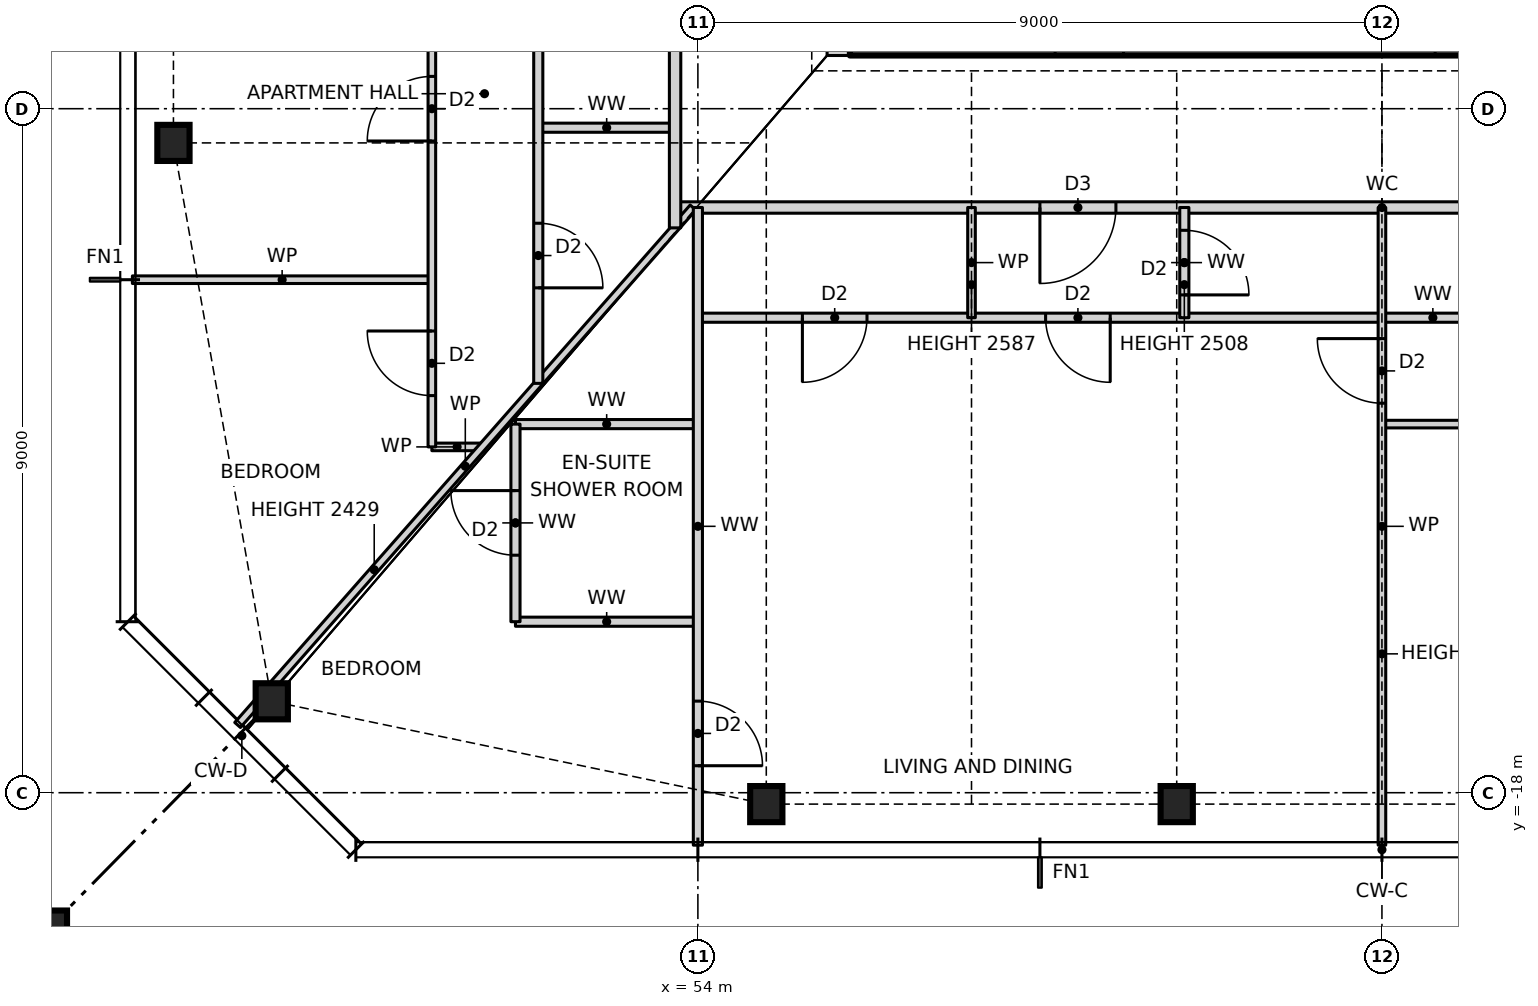
"""IFC4 building model, lengths in metres.
Left out: names, types, materials, properties, quantities, classifications, styles, units other than length and angle.
Written with IfcOpenShell. Run it as: python <this file> out.ifc"""

import sys

from ifc_helpers import new_model, si_unit, direction, frame, frame_2d, origin, origin_2d, place, context, subcontext, project, spatial, rectangle, hollow_rectangle, i_section, extrude, element, fill, save


model = new_model("IFC4")
c1 = context("Model", 3, precision=1e-05, world=origin(), true_north=direction((0.0, 1.0)))
c2 = subcontext(c1, "Body", "Model", "MODEL_VIEW")
j1 = project(units=[si_unit("LENGTHUNIT", "METRE"), si_unit("PLANEANGLEUNIT", "RADIAN")], contexts=[c1])
p1 = place(None, origin())
s1 = spatial("IfcSite", under=j1, at=p1, CompositionType="ELEMENT")
p2 = place(p1, origin())
s2 = spatial("IfcBuilding", under=s1, at=p2, CompositionType="ELEMENT")
p3 = place(p2, frame((0.0, 0.0, 50.0)))
s3 = spatial("IfcBuildingStorey", under=s2, at=p3, CompositionType="ELEMENT", Elevation=50.0)
for number, where, z_axis, x_axis in (
    (1, (48.394, -16.797, 0.0), (0.0, 0.0, 1.0), (1.0, 0.0, 0.0)),
    (2, (54.9, -18.15, 0.0), (0.0, 0.0, 1.0), (1.0, 0.0, 0.0)),
    (3, (60.3, -18.15, 0.0), (0.0, 0.0, 1.0), (1.0, 0.0, 0.0)),
    (4, (47.1, -9.45, 0.0), (0.0, 0.0, 1.0), (1.0, 0.0, 0.0)),
):
    element("IfcColumn", number, at=place(p3, frame(where, z_axis=z_axis, x_axis=x_axis)), inside=s3, PredefinedType="COLUMN", context=c2, shape_type="SweptSolid", body=[
        extrude(i_section(OverallWidth=0.424, OverallDepth=0.475, WebThickness=0.048, FlangeThickness=0.077, at=origin_2d()), origin(), (0.0, 0.0, 1.0), 3.5),
    ])
p4 = place(p3, frame((45.1, -20.15, 0.0), z_axis=(0.0, 0.0, 1.0), x_axis=(1.0, 0.0, 0.0)))
e5 = element("IfcColumn", 5, at=p4, inside=s3, PredefinedType="COLUMN", context=c2, shape_type="SweptSolid", body=[
    extrude(hollow_rectangle(XDim=1.2, YDim=1.2, WallThickness=0.07, at=origin_2d()), origin(), (0.0, 0.0, 1.0), 3.5),
])
p5 = place(p3, frame((55.7, -8.15, 0.0), z_axis=(0.0, 0.0, 1.0), x_axis=(1.0, 0.0, 0.0)))
e6 = element("IfcWall", 6, at=p5, inside=s3, PredefinedType="SOLIDWALL", context=c2, shape_type="SweptSolid", body=[
    extrude(rectangle(XDim=0.3, YDim=0.3, at=frame_2d((0.15, 0.0))), origin(), (0.0, 0.0, 1.0), 3.5),
])
p6 = place(p3, frame((56.0, -8.0, 0.0), z_axis=(0.0, 0.0, 1.0), x_axis=(1.0, 0.0, 0.0)))
e7 = element("IfcWall", 7, at=p6, inside=s3, PredefinedType="SHEAR", context=c2, shape_type="SweptSolid", body=[
    extrude(rectangle(XDim=14.0, YDim=0.6, at=frame_2d((7.0, 0.0))), origin(), (0.0, 0.0, 1.0), 3.5),
])
p7 = place(p6, frame((2.7, 0.0, 0.0)))
e8 = element("IfcOpeningElement", 8, at=p7, cuts=e7, PredefinedType="OPENING", context=c2, shape_type="SweptSolid", body=[
    extrude(rectangle(XDim=0.9, YDim=2.1, at=frame_2d((0.45, 1.05))), frame((0.0, 0.31, 0.0), z_axis=(0.0, -1.0, 0.0), x_axis=(1.0, 0.0, 0.0)), (0.0, 0.0, 1.0), 0.62),
])
p8 = place(p6, frame((7.7, 0.0, 0.0)))
e9 = element("IfcOpeningElement", 9, at=p8, cuts=e7, PredefinedType="OPENING", context=c2, shape_type="SweptSolid", body=[
    extrude(rectangle(XDim=0.9, YDim=2.1, at=frame_2d((0.45, 1.05))), frame((0.0, 0.31, 0.0), z_axis=(0.0, -1.0, 0.0), x_axis=(1.0, 0.0, 0.0)), (0.0, 0.0, 1.0), 0.62),
])
p9 = place(p3, frame((51.6, -15.75, 0.0), z_axis=(0.0, 0.0, 1.0), x_axis=(1.0, 0.0, 0.0)))
e10 = element("IfcWall", 10, at=p9, inside=s3, PredefinedType="PARTITIONING", context=c2, shape_type="SweptSolid", body=[
    extrude(rectangle(XDim=2.4, YDim=0.12, at=frame_2d((1.2, 0.0))), origin(), (0.0, 0.0, 1.0), 3.27),
])
p10 = place(p3, frame((50.5, -13.45, 0.0), z_axis=(0.0, 0.0, 1.0), x_axis=(1.0, 0.0, 0.0)))
e11 = element("IfcWall", 11, at=p10, inside=s3, PredefinedType="PARTITIONING", context=c2, shape_type="SweptSolid", body=[
    extrude(rectangle(XDim=0.664, YDim=0.1, at=frame_2d((0.332, 0.0))), origin(), (0.0, 0.0, 1.0), 3.27),
])
p11 = place(p3, frame((51.6, -13.15, 0.0), z_axis=(0.0, 0.0, 1.0), x_axis=(1.0, 0.0, 0.0)))
e12 = element("IfcWall", 12, at=p11, inside=s3, PredefinedType="PARTITIONING", context=c2, shape_type="SweptSolid", body=[
    extrude(rectangle(XDim=2.4, YDim=0.12, at=frame_2d((1.2, 0.0))), origin(), (0.0, 0.0, 1.0), 3.27),
])
p12 = place(p3, frame((63.0, -13.15, 0.0), z_axis=(0.0, 0.0, 1.0), x_axis=(1.0, 0.0, 0.0)))
e13 = element("IfcWall", 13, at=p12, inside=s3, PredefinedType="PARTITIONING", context=c2, shape_type="SweptSolid", body=[
    extrude(rectangle(XDim=11.2, YDim=0.1, at=frame_2d((5.6, 0.0))), origin(), (0.0, 0.0, 1.0), 3.27),
])
p13 = place(p12, frame((1.825, 0.0, 0.0)))
e14 = element("IfcOpeningElement", 14, at=p13, cuts=e13, PredefinedType="OPENING", context=c2, shape_type="SweptSolid", body=[
    extrude(rectangle(XDim=0.85, YDim=2.1, at=frame_2d((0.425, 1.05))), frame((0.0, 0.06, 0.0), z_axis=(0.0, -1.0, 0.0), x_axis=(1.0, 0.0, 0.0)), (0.0, 0.0, 1.0), 0.12),
])
p14 = place(p12, frame((6.325, 0.0, 0.0)))
e15 = element("IfcOpeningElement", 15, at=p14, cuts=e13, PredefinedType="OPENING", context=c2, shape_type="SweptSolid", body=[
    extrude(rectangle(XDim=0.85, YDim=2.1, at=frame_2d((0.425, 1.05))), frame((0.0, 0.06, 0.0), z_axis=(0.0, -1.0, 0.0), x_axis=(1.0, 0.0, 0.0)), (0.0, 0.0, 1.0), 0.12),
])
p15 = place(p12, frame((9.675, 0.0, 0.0)))
e16 = element("IfcOpeningElement", 16, at=p15, cuts=e13, PredefinedType="OPENING", context=c2, shape_type="SweptSolid", body=[
    extrude(rectangle(XDim=0.85, YDim=2.1, at=frame_2d((0.425, 1.05))), frame((0.0, 0.06, 0.0), z_axis=(0.0, -1.0, 0.0), x_axis=(1.0, 0.0, 0.0)), (0.0, 0.0, 1.0), 0.12),
])
p16 = place(p3, frame((54.0, -11.75, 0.0), z_axis=(0.0, 0.0, 1.0), x_axis=(1.0, 0.0, 0.0)))
e17 = element("IfcWall", 17, at=p16, inside=s3, PredefinedType="PARTITIONING", context=c2, shape_type="SweptSolid", body=[
    extrude(rectangle(XDim=19.34, YDim=0.12, at=frame_2d((9.67, 0.0))), origin(), (0.0, 0.0, 1.0), 3.27),
])
p17 = place(p16, frame((1.375, 0.0, 0.0)))
e18 = element("IfcOpeningElement", 18, at=p17, cuts=e17, PredefinedType="OPENING", context=c2, shape_type="SweptSolid", body=[
    extrude(rectangle(XDim=0.85, YDim=2.1, at=frame_2d((0.425, 1.05))), frame((0.0, 0.07, 0.0), z_axis=(0.0, -1.0, 0.0), x_axis=(1.0, 0.0, 0.0)), (0.0, 0.0, 1.0), 0.14),
])
p18 = place(p16, frame((4.575, 0.0, 0.0)))
e19 = element("IfcOpeningElement", 19, at=p18, cuts=e17, PredefinedType="OPENING", context=c2, shape_type="SweptSolid", body=[
    extrude(rectangle(XDim=0.85, YDim=2.1, at=frame_2d((0.425, 1.05))), frame((0.0, 0.07, 0.0), z_axis=(0.0, -1.0, 0.0), x_axis=(1.0, 0.0, 0.0)), (0.0, 0.0, 1.0), 0.14),
])
p19 = place(p16, frame((11.325, 0.0, 0.0)))
e20 = element("IfcOpeningElement", 20, at=p19, cuts=e17, PredefinedType="OPENING", context=c2, shape_type="SweptSolid", body=[
    extrude(rectangle(XDim=0.85, YDim=2.1, at=frame_2d((0.425, 1.05))), frame((0.0, 0.07, 0.0), z_axis=(0.0, -1.0, 0.0), x_axis=(1.0, 0.0, 0.0)), (0.0, 0.0, 1.0), 0.14),
])
p20 = place(p16, frame((16.495, 0.0, 0.0)))
e21 = element("IfcOpeningElement", 21, at=p20, cuts=e17, PredefinedType="OPENING", context=c2, shape_type="SweptSolid", body=[
    extrude(rectangle(XDim=0.85, YDim=2.1, at=frame_2d((0.425, 1.05))), frame((0.0, 0.07, 0.0), z_axis=(0.0, -1.0, 0.0), x_axis=(1.0, 0.0, 0.0)), (0.0, 0.0, 1.0), 0.14),
])
p21 = place(p3, frame((46.56, -11.25, 0.0), z_axis=(0.0, 0.0, 1.0), x_axis=(1.0, 0.0, 0.0)))
e22 = element("IfcWall", 22, at=p21, inside=s3, PredefinedType="PARTITIONING", context=c2, shape_type="SweptSolid", body=[
    extrude(rectangle(XDim=3.94, YDim=0.1, at=frame_2d((1.97, 0.0))), origin(), (0.0, 0.0, 1.0), 3.27),
])
p22 = place(p3, frame((53.7, -10.3, 0.0), z_axis=(0.0, 0.0, 1.0), x_axis=(1.0, 0.0, 0.0)))
e23 = element("IfcWall", 23, at=p22, inside=s3, PredefinedType="PARTITIONING", context=c2, shape_type="SweptSolid", body=[
    extrude(rectangle(XDim=18.6, YDim=0.15, at=frame_2d((9.3, 0.0))), origin(), (0.0, 0.0, 1.0), 3.27),
])
p23 = place(p22, frame((4.8, 0.0, 0.0)))
e24 = element("IfcOpeningElement", 24, at=p23, cuts=e23, PredefinedType="OPENING", context=c2, shape_type="SweptSolid", body=[
    extrude(rectangle(XDim=1.0, YDim=2.1, at=frame_2d((0.5, 1.05))), frame((0.0, 0.085, 0.0), z_axis=(0.0, -1.0, 0.0), x_axis=(1.0, 0.0, 0.0)), (0.0, 0.0, 1.0), 0.17),
])
p24 = place(p3, frame((51.9, -9.25, 0.0), z_axis=(0.0, 0.0, 1.0), x_axis=(1.0, 0.0, 0.0)))
e25 = element("IfcWall", 25, at=p24, inside=s3, PredefinedType="PARTITIONING", context=c2, shape_type="SweptSolid", body=[
    extrude(rectangle(XDim=1.8, YDim=0.12, at=frame_2d((0.9, 0.0))), origin(), (0.0, 0.0, 1.0), 3.27),
])
p25 = place(p3, frame((47.944, -17.109, 0.0), z_axis=(0.0, 0.0, 1.0), x_axis=(0.660638210404, 0.750704439146, 0.0)))
e26 = element("IfcWall", 26, at=p25, inside=s3, PredefinedType="PARTITIONING", context=c2, shape_type="SweptSolid", body=[
    extrude(rectangle(XDim=9.07, YDim=0.1, at=frame_2d((4.535, 0.0))), origin(), (0.0, 0.0, 1.0), 2.429),
])
p26 = place(p3, frame((63.0, -18.69, 0.0), z_axis=(0.0, 0.0, 1.0), x_axis=(0.0, 1.0, 0.0)))
e27 = element("IfcWall", 27, at=p26, inside=s3, PredefinedType="PARTITIONING", context=c2, shape_type="SweptSolid", body=[
    extrude(rectangle(XDim=8.39, YDim=0.1, at=frame_2d((4.195, 0.0))), origin(), (0.0, 0.0, 1.0), 2.587),
])
p27 = place(p26, frame((5.815, 0.0, 0.0)))
e28 = element("IfcOpeningElement", 28, at=p27, cuts=e27, PredefinedType="OPENING", context=c2, shape_type="SweptSolid", body=[
    extrude(rectangle(XDim=0.85, YDim=2.1, at=frame_2d((0.425, 1.05))), frame((0.0, 0.06, 0.0), z_axis=(0.0, -1.0, 0.0), x_axis=(1.0, 0.0, 0.0)), (0.0, 0.0, 1.0), 0.12),
])
p28 = place(p3, frame((60.4, -11.75, 0.0), z_axis=(0.0, 0.0, 1.0), x_axis=(0.0, 1.0, 0.0)))
e29 = element("IfcWall", 29, at=p28, inside=s3, PredefinedType="PARTITIONING", context=c2, shape_type="SweptSolid", body=[
    extrude(rectangle(XDim=1.45, YDim=0.12, at=frame_2d((0.725, 0.0))), origin(), (0.0, 0.0, 1.0), 2.508),
])
p29 = place(p28, frame((0.3, 0.0, 0.0)))
e30 = element("IfcOpeningElement", 30, at=p29, cuts=e29, PredefinedType="OPENING", context=c2, shape_type="SweptSolid", body=[
    extrude(rectangle(XDim=0.85, YDim=2.1, at=frame_2d((0.425, 1.05))), frame((0.0, 0.07, 0.0), z_axis=(0.0, -1.0, 0.0), x_axis=(1.0, 0.0, 0.0)), (0.0, 0.0, 1.0), 0.14),
])
p30 = place(p3, frame((57.6, -11.75, 0.0), z_axis=(0.0, 0.0, 1.0), x_axis=(0.0, 1.0, 0.0)))
e31 = element("IfcWall", 31, at=p30, inside=s3, PredefinedType="PARTITIONING", context=c2, shape_type="SweptSolid", body=[
    extrude(rectangle(XDim=1.45, YDim=0.1, at=frame_2d((0.725, 0.0))), origin(), (0.0, 0.0, 1.0), 2.587),
])
p31 = place(p3, frame((54.0, -18.69, 0.0), z_axis=(0.0, 0.0, 1.0), x_axis=(0.0, 1.0, 0.0)))
e32 = element("IfcWall", 32, at=p31, inside=s3, PredefinedType="PARTITIONING", context=c2, shape_type="SweptSolid", body=[
    extrude(rectangle(XDim=8.39, YDim=0.12, at=frame_2d((4.195, 0.0))), origin(), (0.0, 0.0, 1.0), 3.27),
])
p32 = place(p31, frame((1.045, 0.0, 0.0)))
e33 = element("IfcOpeningElement", 33, at=p32, cuts=e32, PredefinedType="OPENING", context=c2, shape_type="SweptSolid", body=[
    extrude(rectangle(XDim=0.85, YDim=2.1, at=frame_2d((0.425, 1.05))), frame((0.0, 0.07, 0.0), z_axis=(0.0, -1.0, 0.0), x_axis=(1.0, 0.0, 0.0)), (0.0, 0.0, 1.0), 0.14),
])
p33 = place(p3, frame((53.7, -10.568, 0.0), z_axis=(0.0, 0.0, 1.0), x_axis=(0.0, 1.0, 0.0)))
e34 = element("IfcWall", 34, at=p33, inside=s3, PredefinedType="PARTITIONING", context=c2, shape_type="SweptSolid", body=[
    extrude(rectangle(XDim=21.136, YDim=0.15, at=frame_2d((10.568, 0.0))), origin(), (0.0, 0.0, 1.0), 3.27),
])
p34 = place(p33, frame((16.318, 0.0, 0.0)))
e35 = element("IfcOpeningElement", 35, at=p34, cuts=e34, PredefinedType="OPENING", context=c2, shape_type="SweptSolid", body=[
    extrude(rectangle(XDim=1.0, YDim=2.1, at=frame_2d((0.5, 1.05))), frame((0.0, 0.085, 0.0), z_axis=(0.0, -1.0, 0.0), x_axis=(1.0, 0.0, 0.0)), (0.0, 0.0, 1.0), 0.17),
])
p35 = place(p33, frame((10.918, 0.0, 0.0)))
e36 = element("IfcOpeningElement", 36, at=p35, cuts=e34, PredefinedType="OPENING", context=c2, shape_type="SweptSolid", body=[
    extrude(rectangle(XDim=1.0, YDim=2.1, at=frame_2d((0.5, 1.05))), frame((0.0, 0.085, 0.0), z_axis=(0.0, -1.0, 0.0), x_axis=(1.0, 0.0, 0.0)), (0.0, 0.0, 1.0), 0.17),
])
p36 = place(p3, frame((51.9, -12.614, 0.0), z_axis=(0.0, 0.0, 1.0), x_axis=(0.0, 1.0, 0.0)))
e37 = element("IfcWall", 37, at=p36, inside=s3, PredefinedType="PARTITIONING", context=c2, shape_type="SweptSolid", body=[
    extrude(rectangle(XDim=10.364, YDim=0.12, at=frame_2d((5.182, 0.0))), origin(), (0.0, 0.0, 1.0), 3.27),
])
p37 = place(p36, frame((8.639, 0.0, 0.0)))
e38 = element("IfcOpeningElement", 38, at=p37, cuts=e37, PredefinedType="OPENING", context=c2, shape_type="SweptSolid", body=[
    extrude(rectangle(XDim=0.85, YDim=2.1, at=frame_2d((0.425, 1.05))), frame((0.0, 0.07, 0.0), z_axis=(0.0, -1.0, 0.0), x_axis=(1.0, 0.0, 0.0)), (0.0, 0.0, 1.0), 0.14),
])
p38 = place(p36, frame((5.139, 0.0, 0.0)))
e39 = element("IfcOpeningElement", 39, at=p38, cuts=e37, PredefinedType="OPENING", context=c2, shape_type="SweptSolid", body=[
    extrude(rectangle(XDim=0.85, YDim=2.1, at=frame_2d((0.425, 1.05))), frame((0.0, 0.07, 0.0), z_axis=(0.0, -1.0, 0.0), x_axis=(1.0, 0.0, 0.0)), (0.0, 0.0, 1.0), 0.14),
])
p39 = place(p36, frame((1.257, 0.0, 0.0)))
e40 = element("IfcOpeningElement", 40, at=p39, cuts=e37, PredefinedType="OPENING", context=c2, shape_type="SweptSolid", body=[
    extrude(rectangle(XDim=0.85, YDim=2.1, at=frame_2d((0.425, 1.05))), frame((0.0, 0.07, 0.0), z_axis=(0.0, -1.0, 0.0), x_axis=(1.0, 0.0, 0.0)), (0.0, 0.0, 1.0), 0.14),
])
p40 = place(p3, frame((51.6, -15.75, 0.0), z_axis=(0.0, 0.0, 1.0), x_axis=(0.0, 1.0, 0.0)))
e41 = element("IfcWall", 41, at=p40, inside=s3, PredefinedType="PARTITIONING", context=c2, shape_type="SweptSolid", body=[
    extrude(rectangle(XDim=2.6, YDim=0.12, at=frame_2d((1.3, 0.0))), origin(), (0.0, 0.0, 1.0), 3.27),
])
p41 = place(p40, frame((0.875, 0.0, 0.0)))
e42 = element("IfcOpeningElement", 42, at=p41, cuts=e41, PredefinedType="OPENING", context=c2, shape_type="SweptSolid", body=[
    extrude(rectangle(XDim=0.85, YDim=2.1, at=frame_2d((0.425, 1.05))), frame((0.0, 0.07, 0.0), z_axis=(0.0, -1.0, 0.0), x_axis=(1.0, 0.0, 0.0)), (0.0, 0.0, 1.0), 0.14),
])
p42 = place(p3, frame((50.5, -13.45, 0.0), z_axis=(0.0, 0.0, 1.0), x_axis=(0.0, 1.0, 0.0)))
e43 = element("IfcWall", 43, at=p42, inside=s3, PredefinedType="PARTITIONING", context=c2, shape_type="SweptSolid", body=[
    extrude(rectangle(XDim=11.2, YDim=0.1, at=frame_2d((5.6, 0.0))), origin(), (0.0, 0.0, 1.0), 3.27),
])
p43 = place(p42, frame((9.725, 0.0, 0.0)))
e44 = element("IfcOpeningElement", 44, at=p43, cuts=e43, PredefinedType="OPENING", context=c2, shape_type="SweptSolid", body=[
    extrude(rectangle(XDim=0.85, YDim=2.1, at=frame_2d((0.425, 1.05))), frame((0.0, 0.06, 0.0), z_axis=(0.0, -1.0, 0.0), x_axis=(1.0, 0.0, 0.0)), (0.0, 0.0, 1.0), 0.12),
])
p44 = place(p42, frame((4.025, 0.0, 0.0)))
e45 = element("IfcOpeningElement", 45, at=p44, cuts=e43, PredefinedType="OPENING", context=c2, shape_type="SweptSolid", body=[
    extrude(rectangle(XDim=0.85, YDim=2.1, at=frame_2d((0.425, 1.05))), frame((0.0, 0.06, 0.0), z_axis=(0.0, -1.0, 0.0), x_axis=(1.0, 0.0, 0.0)), (0.0, 0.0, 1.0), 0.12),
])
p45 = place(p42, frame((0.675, 0.0, 0.0)))
e46 = element("IfcOpeningElement", 46, at=p45, cuts=e43, PredefinedType="OPENING", context=c2, shape_type="SweptSolid", body=[
    extrude(rectangle(XDim=0.85, YDim=2.1, at=frame_2d((0.425, 1.05))), frame((0.0, 0.06, 0.0), z_axis=(0.0, -1.0, 0.0), x_axis=(1.0, 0.0, 0.0)), (0.0, 0.0, 1.0), 0.12),
])
p46 = place(p17, frame((0.85, 0.0, 0.0), z_axis=(0.0, 0.0, 1.0), x_axis=(-1.0, 0.0, 0.0)))
e47 = element("IfcDoor", 47, at=p46, inside=s3, OperationType="SINGLE_SWING_RIGHT", PredefinedType="DOOR", context=c2, shape_type="SweptSolid", body=[
    extrude(rectangle(XDim=0.85, YDim=2.1, at=frame_2d((0.425, 1.05))), frame((0.0, 0.025, 0.0), z_axis=(0.0, -1.0, 0.0), x_axis=(1.0, 0.0, 0.0)), (0.0, 0.0, 1.0), 0.05),
])
fill(e18, e47)
p47 = place(p23, frame((1.0, 0.0, 0.0), z_axis=(0.0, 0.0, 1.0), x_axis=(-1.0, 0.0, 0.0)))
e48 = element("IfcDoor", 48, at=p47, inside=s3, OperationType="SINGLE_SWING_RIGHT", PredefinedType="DOOR", context=c2, shape_type="SweptSolid", body=[
    extrude(rectangle(XDim=1.0, YDim=2.1, at=frame_2d((0.5, 1.05))), frame((0.0, 0.025, 0.0), z_axis=(0.0, -1.0, 0.0), x_axis=(1.0, 0.0, 0.0)), (0.0, 0.0, 1.0), 0.05),
])
fill(e24, e48)
p48 = place(p18, frame((0.85, 0.0, 0.0), z_axis=(0.0, 0.0, 1.0), x_axis=(-1.0, 0.0, 0.0)))
e49 = element("IfcDoor", 49, at=p48, inside=s3, OperationType="SINGLE_SWING_LEFT", PredefinedType="DOOR", context=c2, shape_type="SweptSolid", body=[
    extrude(rectangle(XDim=0.85, YDim=2.1, at=frame_2d((0.425, 1.05))), frame((0.0, 0.025, 0.0), z_axis=(0.0, -1.0, 0.0), x_axis=(1.0, 0.0, 0.0)), (0.0, 0.0, 1.0), 0.05),
])
fill(e19, e49)
p49 = place(p29, frame((0.85, 0.0, 0.0), z_axis=(0.0, 0.0, 1.0), x_axis=(-1.0, 0.0, 0.0)))
e50 = element("IfcDoor", 50, at=p49, inside=s3, OperationType="SINGLE_SWING_RIGHT", PredefinedType="DOOR", context=c2, shape_type="SweptSolid", body=[
    extrude(rectangle(XDim=0.85, YDim=2.1, at=frame_2d((0.425, 1.05))), frame((0.0, 0.025, 0.0), z_axis=(0.0, -1.0, 0.0), x_axis=(1.0, 0.0, 0.0)), (0.0, 0.0, 1.0), 0.05),
])
fill(e30, e50)
p50 = place(p41, origin())
e51 = element("IfcDoor", 51, at=p50, inside=s3, OperationType="SINGLE_SWING_RIGHT", PredefinedType="DOOR", context=c2, shape_type="SweptSolid", body=[
    extrude(rectangle(XDim=0.85, YDim=2.1, at=frame_2d((0.425, 1.05))), frame((0.0, 0.025, 0.0), z_axis=(0.0, -1.0, 0.0), x_axis=(1.0, 0.0, 0.0)), (0.0, 0.0, 1.0), 0.05),
])
fill(e42, e51)
p51 = place(p32, frame((0.85, 0.0, 0.0), z_axis=(0.0, 0.0, 1.0), x_axis=(-1.0, 0.0, 0.0)))
e52 = element("IfcDoor", 52, at=p51, inside=s3, OperationType="SINGLE_SWING_RIGHT", PredefinedType="DOOR", context=c2, shape_type="SweptSolid", body=[
    extrude(rectangle(XDim=0.85, YDim=2.1, at=frame_2d((0.425, 1.05))), frame((0.0, 0.025, 0.0), z_axis=(0.0, -1.0, 0.0), x_axis=(1.0, 0.0, 0.0)), (0.0, 0.0, 1.0), 0.05),
])
fill(e33, e52)
p52 = place(p27, origin())
e53 = element("IfcDoor", 53, at=p52, inside=s3, OperationType="SINGLE_SWING_RIGHT", PredefinedType="DOOR", context=c2, shape_type="SweptSolid", body=[
    extrude(rectangle(XDim=0.85, YDim=2.1, at=frame_2d((0.425, 1.05))), frame((0.0, 0.025, 0.0), z_axis=(0.0, -1.0, 0.0), x_axis=(1.0, 0.0, 0.0)), (0.0, 0.0, 1.0), 0.05),
])
fill(e28, e53)
p53 = place(p44, origin())
e54 = element("IfcDoor", 54, at=p53, inside=s3, OperationType="SINGLE_SWING_LEFT", PredefinedType="DOOR", context=c2, shape_type="SweptSolid", body=[
    extrude(rectangle(XDim=0.85, YDim=2.1, at=frame_2d((0.425, 1.05))), frame((0.0, 0.025, 0.0), z_axis=(0.0, -1.0, 0.0), x_axis=(1.0, 0.0, 0.0)), (0.0, 0.0, 1.0), 0.05),
])
fill(e45, e54)
p54 = place(p45, origin())
e55 = element("IfcDoor", 55, at=p54, inside=s3, OperationType="SINGLE_SWING_RIGHT", PredefinedType="DOOR", context=c2, shape_type="SweptSolid", body=[
    extrude(rectangle(XDim=0.85, YDim=2.1, at=frame_2d((0.425, 1.05))), frame((0.0, 0.025, 0.0), z_axis=(0.0, -1.0, 0.0), x_axis=(1.0, 0.0, 0.0)), (0.0, 0.0, 1.0), 0.05),
])
fill(e46, e55)
p55 = place(p39, frame((0.85, 0.0, 0.0), z_axis=(0.0, 0.0, 1.0), x_axis=(-1.0, 0.0, 0.0)))
e56 = element("IfcDoor", 56, at=p55, inside=s3, OperationType="SINGLE_SWING_RIGHT", PredefinedType="DOOR", context=c2, shape_type="SweptSolid", body=[
    extrude(rectangle(XDim=0.85, YDim=2.1, at=frame_2d((0.425, 1.05))), frame((0.0, 0.025, 0.0), z_axis=(0.0, -1.0, 0.0), x_axis=(1.0, 0.0, 0.0)), (0.0, 0.0, 1.0), 0.05),
])
fill(e40, e56)
save(model, sys.argv[1])
